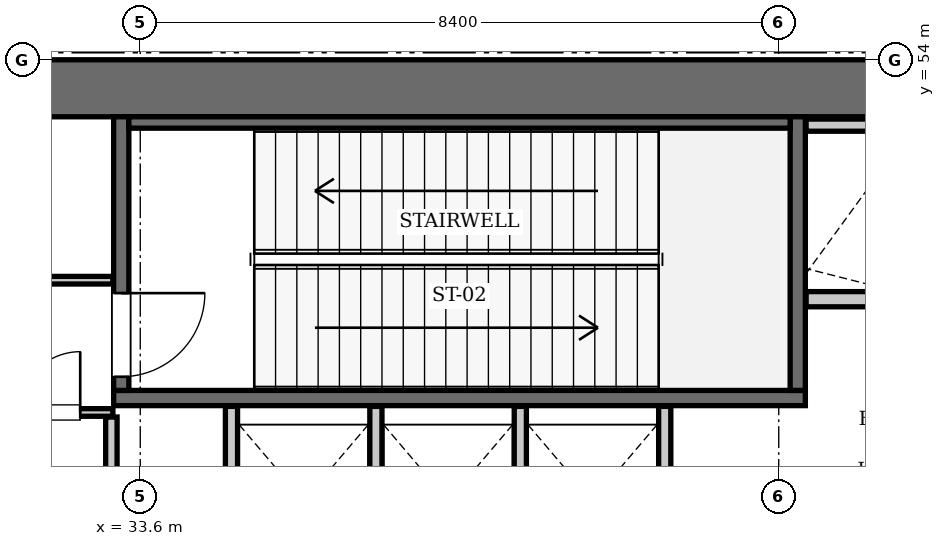
"""IFC4 building model, lengths in metres.
Left out: names, types, materials, properties, quantities, classifications, styles, units other than length and angle.
Written with IfcOpenShell. Run it as: python <this file> out.ifc"""

import sys

from ifc_helpers import new_model, si_unit, direction, frame, frame_2d, origin, place, context, subcontext, project, spatial, rectangle, extrude, element, fill, save


model = new_model("IFC4")
c1 = context("Model", 3, precision=1e-05, world=origin(), true_north=direction((0.0, 1.0)))
c2 = subcontext(c1, "Body", "Model", "MODEL_VIEW")
j1 = project(units=[si_unit("LENGTHUNIT", "METRE"), si_unit("PLANEANGLEUNIT", "RADIAN")], contexts=[c1])
p1 = place(None, origin())
s1 = spatial("IfcSite", under=j1, at=p1, CompositionType="ELEMENT")
p2 = place(p1, origin())
s2 = spatial("IfcBuilding", under=s1, at=p2, CompositionType="ELEMENT")
p3 = place(p2, frame((0.0, 0.0, 227.5)))
s3 = spatial("IfcBuildingStorey", under=s2, at=p3, CompositionType="ELEMENT", Elevation=227.5)
p4 = place(p3, frame((25.2, 53.625, 0.0), z_axis=(0.0, 0.0, 1.0), x_axis=(1.0, 0.0, 0.0)))
e1 = element("IfcWall", 1, at=p4, inside=s3, PredefinedType="SHEAR", context=c2, shape_type="SweptSolid", body=[
    extrude(rectangle(XDim=25.2, YDim=0.75, at=frame_2d((12.6, 0.0))), origin(), (0.0, 0.0, 1.0), 7.0),
])
p5 = place(p3, frame((33.25, 49.55, 0.0), z_axis=(0.0, 0.0, 1.0), x_axis=(1.0, 0.0, 0.0)))
e2 = element("IfcWall", 2, at=p5, inside=s3, PredefinedType="SOLIDWALL", context=c2, shape_type="SweptSolid", body=[
    extrude(rectangle(XDim=9.1, YDim=0.2, at=frame_2d((4.55, 0.0))), origin(), (0.0, 0.0, 1.0), 6.76),
])
p6 = place(p3, frame((42.25, 49.65, 0.0), z_axis=(0.0, 0.0, 1.0), x_axis=(0.0, 1.0, 0.0)))
e3 = element("IfcWall", 3, at=p6, inside=s3, PredefinedType="SOLIDWALL", context=c2, shape_type="SweptSolid", body=[
    extrude(rectangle(XDim=3.6, YDim=0.2, at=frame_2d((1.8, 0.0))), origin(), (0.0, 0.0, 1.0), 6.76),
])
p7 = place(p3, frame((33.35, 49.65, 0.0), z_axis=(0.0, 0.0, 1.0), x_axis=(0.0, 1.0, 0.0)))
e4 = element("IfcWall", 4, at=p7, inside=s3, PredefinedType="SOLIDWALL", context=c2, shape_type="SweptSolid", body=[
    extrude(rectangle(XDim=3.6, YDim=0.2, at=frame_2d((1.8, 0.0))), origin(), (0.0, 0.0, 1.0), 6.76),
])
p8 = place(p7, frame((0.18, 0.0, 0.0)))
e5 = element("IfcOpeningElement", 5, at=p8, cuts=e4, PredefinedType="OPENING", context=c2, shape_type="SweptSolid", body=[
    extrude(rectangle(XDim=1.1, YDim=2.15, at=frame_2d((0.55, 1.075))), frame((0.0, 0.11, 0.0), z_axis=(0.0, -1.0, 0.0), x_axis=(1.0, 0.0, 0.0)), (0.0, 0.0, 1.0), 0.22),
])
p9 = place(p3, frame((33.45, 53.175, 0.0), z_axis=(0.0, 0.0, 1.0), x_axis=(1.0, 0.0, 0.0)))
e6 = element("IfcWall", 6, at=p9, inside=s3, PredefinedType="SOLIDWALL", context=c2, shape_type="SweptSolid", body=[
    extrude(rectangle(XDim=8.7, YDim=0.15, at=frame_2d((4.35, 0.0))), origin(), (0.0, 0.0, 1.0), 6.76),
])
p10 = place(p3, frame((42.36, 50.85, 0.0), z_axis=(0.0, 0.0, 1.0), x_axis=(1.0, 0.0, 0.0)))
e7 = element("IfcWall", 7, at=p10, inside=s3, PredefinedType="SOLIDWALL", context=c2, shape_type="SweptSolid", body=[
    extrude(rectangle(XDim=1.38, YDim=0.2, at=frame_2d((0.69, 0.0))), origin(), (0.0, 0.0, 1.0), 6.76),
])
p11 = place(p3, frame((42.36, 53.14, 0.0), z_axis=(0.0, 0.0, 1.0), x_axis=(1.0, 0.0, 0.0)))
e8 = element("IfcWall", 8, at=p11, inside=s3, PredefinedType="SOLIDWALL", context=c2, shape_type="SweptSolid", body=[
    extrude(rectangle(XDim=3.14, YDim=0.16, at=frame_2d((1.57, 0.0))), origin(), (0.0, 0.0, 1.0), 6.76),
])
for number, where, z_axis, x_axis in (
    (9, (34.8, 47.25, 0.0), (0.0, 0.0, 1.0), (0.0, 1.0, 0.0)),
    (10, (36.7, 47.25, 0.0), (0.0, 0.0, 1.0), (0.0, 1.0, 0.0)),
    (11, (38.6, 47.25, 0.0), (0.0, 0.0, 1.0), (0.0, 1.0, 0.0)),
    (12, (40.5, 47.25, 0.0), (0.0, 0.0, 1.0), (0.0, 1.0, 0.0)),
):
    element("IfcWall", number, at=place(p3, frame(where, z_axis=z_axis, x_axis=x_axis)), inside=s3, PredefinedType="SOLIDWALL", context=c2, shape_type="SweptSolid", body=[
        extrude(rectangle(XDim=2.19, YDim=0.16, at=frame_2d((1.095, 0.0))), origin(), (0.0, 0.0, 1.0), 6.76),
    ])
p12 = place(p3, frame((33.22, 45.14, 0.0), z_axis=(0.0, 0.0, 1.0), x_axis=(0.0, 1.0, 0.0)))
e13 = element("IfcWall", 13, at=p12, inside=s3, PredefinedType="PARTITIONING", context=c2, shape_type="SweptSolid", body=[
    extrude(rectangle(XDim=4.16, YDim=0.15, at=frame_2d((2.08, 0.0))), origin(), (0.0, 0.0, 1.0), 6.76),
])
p13 = place(p3, frame((30.06, 49.36, 0.0), z_axis=(0.0, 0.0, 1.0), x_axis=(1.0, 0.0, 0.0)))
e14 = element("IfcWall", 14, at=p13, inside=s3, PredefinedType="PARTITIONING", context=c2, shape_type="SweptSolid", body=[
    extrude(rectangle(XDim=3.18, YDim=0.1, at=frame_2d((1.59, 0.0))), origin(), (0.0, 0.0, 1.0), 6.76),
])
p14 = place(p13, frame((1.95, 0.0, 0.0)))
e15 = element("IfcOpeningElement", 15, at=p14, cuts=e14, PredefinedType="OPENING", context=c2, shape_type="SweptSolid", body=[
    extrude(rectangle(XDim=0.8, YDim=2.05, at=frame_2d((0.4, 1.025))), frame((0.0, 0.06, 0.0), z_axis=(0.0, -1.0, 0.0), x_axis=(1.0, 0.0, 0.0)), (0.0, 0.0, 1.0), 0.12),
])
p15 = place(p3, frame((31.82, 51.1, 0.0), z_axis=(0.0, 0.0, 1.0), x_axis=(1.0, 0.0, 0.0)))
e16 = element("IfcWall", 16, at=p15, inside=s3, PredefinedType="PARTITIONING", context=c2, shape_type="SweptSolid", body=[
    extrude(rectangle(XDim=1.42, YDim=0.1, at=frame_2d((0.71, 0.0))), origin(), (0.0, 0.0, 1.0), 6.76),
])
p16 = place(p8, frame((1.1, 0.0, 0.0), z_axis=(0.0, 0.0, 1.0), x_axis=(-1.0, 0.0, 0.0)))
e17 = element("IfcDoor", 17, at=p16, inside=s3, OperationType="SINGLE_SWING_LEFT", PredefinedType="DOOR", context=c2, shape_type="SweptSolid", body=[
    extrude(rectangle(XDim=1.1, YDim=2.15, at=frame_2d((0.55, 1.075))), frame((0.0, 0.025, 0.0), z_axis=(0.0, -1.0, 0.0), x_axis=(1.0, 0.0, 0.0)), (0.0, 0.0, 1.0), 0.05),
])
fill(e5, e17)
p17 = place(p14, origin())
e18 = element("IfcDoor", 18, at=p17, inside=s3, OperationType="SINGLE_SWING_RIGHT", PredefinedType="DOOR", context=c2, shape_type="SweptSolid", body=[
    extrude(rectangle(XDim=0.8, YDim=2.05, at=frame_2d((0.4, 1.025))), frame((0.0, 0.025, 0.0), z_axis=(0.0, -1.0, 0.0), x_axis=(1.0, 0.0, 0.0)), (0.0, 0.0, 1.0), 0.05),
])
fill(e15, e18)
save(model, sys.argv[1])
